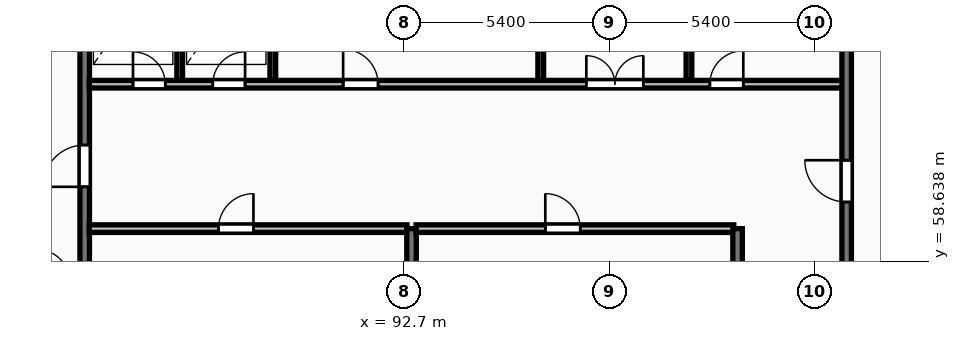
"""IFC4 building model, lengths in metres.
Left out: names, types, materials, properties, quantities, classifications, styles, units other than length and angle.
Written with IfcOpenShell. Run it as: python <this file> out.ifc"""

import sys

from ifc_helpers import new_model, si_unit, direction, frame, frame_2d, origin, place, context, subcontext, project, spatial, rectangle, extrude, element, fill, save


model = new_model("IFC4")
c1 = context("Model", 3, precision=1e-05, world=origin(), true_north=direction((0.0, 1.0)))
c2 = subcontext(c1, "Body", "Model", "MODEL_VIEW")
j1 = project(units=[si_unit("LENGTHUNIT", "METRE"), si_unit("PLANEANGLEUNIT", "RADIAN")], contexts=[c1])
p1 = place(None, origin())
s1 = spatial("IfcSite", under=j1, at=p1, CompositionType="ELEMENT")
p2 = place(p1, origin())
s2 = spatial("IfcBuilding", under=s1, at=p2, CompositionType="ELEMENT")
p3 = place(p2, frame((0.0, 0.0, 256.25)))
s3 = spatial("IfcBuildingStorey", under=s2, at=p3, CompositionType="ELEMENT", Elevation=256.25)
p4 = place(p3, frame((84.3, 55.4, 0.0), z_axis=(0.0, 0.0, 1.0), x_axis=(0.0, 1.0, 0.0)))
e1 = element("IfcWall", 1, at=p4, inside=s3, PredefinedType="SHEAR", context=c2, shape_type="SweptSolid", body=[
    extrude(rectangle(XDim=11.6, YDim=0.25, at=frame_2d((5.8, 0.0))), origin(), (0.0, 0.0, 1.0), 3.45),
])
p5 = place(p4, frame((5.2, 0.0, 0.0)))
e2 = element("IfcOpeningElement", 2, at=p5, cuts=e1, PredefinedType="OPENING", context=c2, shape_type="SweptSolid", body=[
    extrude(rectangle(XDim=1.1, YDim=2.1, at=frame_2d((0.55, 1.05))), frame((0.0, 0.135, 0.0), z_axis=(0.0, -1.0, 0.0), x_axis=(1.0, 0.0, 0.0)), (0.0, 0.0, 1.0), 0.27),
])
p6 = place(p3, frame((84.42, 59.5, 0.0), z_axis=(0.0, 0.0, 1.0), x_axis=(1.0, 0.0, 0.0)))
e3 = element("IfcWall", 3, at=p6, inside=s3, PredefinedType="PARTITIONING", context=c2, shape_type="SweptSolid", body=[
    extrude(rectangle(XDim=8.36, YDim=0.2, at=frame_2d((4.18, 0.0))), origin(), (0.0, 0.0, 1.0), 3.17),
])
p7 = place(p6, frame((3.4, 0.0, 0.0)))
e4 = element("IfcOpeningElement", 4, at=p7, cuts=e3, PredefinedType="OPENING", context=c2, shape_type="SweptSolid", body=[
    extrude(rectangle(XDim=0.92, YDim=2.08, at=frame_2d((0.46, 1.04))), frame((0.0, 0.11, 0.0), z_axis=(0.0, -1.0, 0.0), x_axis=(1.0, 0.0, 0.0)), (0.0, 0.0, 1.0), 0.22),
])
p8 = place(p3, frame((92.9, 55.4, 0.0), z_axis=(0.0, 0.0, 1.0), x_axis=(0.0, 1.0, 0.0)))
e5 = element("IfcWall", 5, at=p8, inside=s3, PredefinedType="SHEAR", context=c2, shape_type="SweptSolid", body=[
    extrude(rectangle(XDim=4.1, YDim=0.25, at=frame_2d((2.05, 0.0))), origin(), (0.0, 0.0, 1.0), 3.45),
])
p9 = place(p3, frame((93.02, 59.5, 0.0), z_axis=(0.0, 0.0, 1.0), x_axis=(1.0, 0.0, 0.0)))
e6 = element("IfcWall", 6, at=p9, inside=s3, PredefinedType="PARTITIONING", context=c2, shape_type="SweptSolid", body=[
    extrude(rectangle(XDim=8.36, YDim=0.2, at=frame_2d((4.18, 0.0))), origin(), (0.0, 0.0, 1.0), 3.17),
])
p10 = place(p9, frame((3.4, 0.0, 0.0)))
e7 = element("IfcOpeningElement", 7, at=p10, cuts=e6, PredefinedType="OPENING", context=c2, shape_type="SweptSolid", body=[
    extrude(rectangle(XDim=0.92, YDim=2.08, at=frame_2d((0.46, 1.04))), frame((0.0, 0.11, 0.0), z_axis=(0.0, -1.0, 0.0), x_axis=(1.0, 0.0, 0.0)), (0.0, 0.0, 1.0), 0.22),
])
p11 = place(p3, frame((101.48, 55.4, 0.0), z_axis=(0.0, 0.0, 1.0), x_axis=(0.0, 1.0, 0.0)))
e8 = element("IfcWall", 8, at=p11, inside=s3, PredefinedType="SHEAR", context=c2, shape_type="SweptSolid", body=[
    extrude(rectangle(XDim=4.1, YDim=0.25, at=frame_2d((2.05, 0.0))), origin(), (0.0, 0.0, 1.0), 3.45),
])
for number, where, z_axis, x_axis in (
    (9, (86.8, 63.4, 0.0), (0.0, 0.0, 1.0), (0.0, 1.0, 0.0)),
    (10, (89.25, 63.4, 0.0), (0.0, 0.0, 1.0), (0.0, 1.0, 0.0)),
    (11, (96.3, 63.4, 0.0), (0.0, 0.0, 1.0), (0.0, 1.0, 0.0)),
    (12, (100.2, 63.4, 0.0), (0.0, 0.0, 1.0), (0.0, 1.0, 0.0)),
):
    element("IfcWall", number, at=place(p3, frame(where, z_axis=z_axis, x_axis=x_axis)), inside=s3, PredefinedType="PARTITIONING", context=c2, shape_type="SweptSolid", body=[
        extrude(rectangle(XDim=3.6, YDim=0.15, at=frame_2d((1.8, 0.0))), origin(), (0.0, 0.0, 1.0), 3.17),
    ])
p12 = place(p3, frame((84.42, 63.3, 0.0), z_axis=(0.0, 0.0, 1.0), x_axis=(1.0, 0.0, 0.0)))
e13 = element("IfcWall", 13, at=p12, inside=s3, PredefinedType="PARTITIONING", context=c2, shape_type="SweptSolid", body=[
    extrude(rectangle(XDim=19.83, YDim=0.2, at=frame_2d((9.915, 0.0))), origin(), (0.0, 0.0, 1.0), 3.17),
])
p13 = place(p12, frame((1.15, 0.0, 0.0)))
e14 = element("IfcOpeningElement", 14, at=p13, cuts=e13, PredefinedType="OPENING", context=c2, shape_type="SweptSolid", body=[
    extrude(rectangle(XDim=0.85, YDim=2.05, at=frame_2d((0.425, 1.025))), frame((0.0, 0.11, 0.0), z_axis=(0.0, -1.0, 0.0), x_axis=(1.0, 0.0, 0.0)), (0.0, 0.0, 1.0), 0.22),
])
p14 = place(p12, frame((3.25, 0.0, 0.0)))
e15 = element("IfcOpeningElement", 15, at=p14, cuts=e13, PredefinedType="OPENING", context=c2, shape_type="SweptSolid", body=[
    extrude(rectangle(XDim=0.85, YDim=2.05, at=frame_2d((0.425, 1.025))), frame((0.0, 0.11, 0.0), z_axis=(0.0, -1.0, 0.0), x_axis=(1.0, 0.0, 0.0)), (0.0, 0.0, 1.0), 0.22),
])
p15 = place(p12, frame((13.08, 0.0, 0.0)))
e16 = element("IfcOpeningElement", 16, at=p15, cuts=e13, PredefinedType="OPENING", context=c2, shape_type="SweptSolid", body=[
    extrude(rectangle(XDim=1.5, YDim=2.2, at=frame_2d((0.75, 1.1))), frame((0.0, 0.11, 0.0), z_axis=(0.0, -1.0, 0.0), x_axis=(1.0, 0.0, 0.0)), (0.0, 0.0, 1.0), 0.22),
])
p16 = place(p12, frame((6.68, 0.0, 0.0)))
e17 = element("IfcOpeningElement", 17, at=p16, cuts=e13, PredefinedType="OPENING", context=c2, shape_type="SweptSolid", body=[
    extrude(rectangle(XDim=0.92, YDim=2.08, at=frame_2d((0.46, 1.04))), frame((0.0, 0.11, 0.0), z_axis=(0.0, -1.0, 0.0), x_axis=(1.0, 0.0, 0.0)), (0.0, 0.0, 1.0), 0.22),
])
p17 = place(p12, frame((16.33, 0.0, 0.0)))
e18 = element("IfcOpeningElement", 18, at=p17, cuts=e13, PredefinedType="OPENING", context=c2, shape_type="SweptSolid", body=[
    extrude(rectangle(XDim=0.88, YDim=2.06, at=frame_2d((0.44, 1.03))), frame((0.0, 0.11, 0.0), z_axis=(0.0, -1.0, 0.0), x_axis=(1.0, 0.0, 0.0)), (0.0, 0.0, 1.0), 0.22),
])
p18 = place(p3, frame((104.35, 58.4, 0.0), z_axis=(0.0, 0.0, 1.0), x_axis=(0.0, 1.0, 0.0)))
e19 = element("IfcWall", 19, at=p18, inside=s3, PredefinedType="SHEAR", context=c2, shape_type="SweptSolid", body=[
    extrude(rectangle(XDim=8.6, YDim=0.25, at=frame_2d((4.3, 0.0))), origin(), (0.0, 0.0, 1.0), 3.45),
])
p19 = place(p18, frame((1.8, 0.0, 0.0)))
e20 = element("IfcOpeningElement", 20, at=p19, cuts=e19, PredefinedType="OPENING", context=c2, shape_type="SweptSolid", body=[
    extrude(rectangle(XDim=1.1, YDim=2.1, at=frame_2d((0.55, 1.05))), frame((0.0, 0.135, 0.0), z_axis=(0.0, -1.0, 0.0), x_axis=(1.0, 0.0, 0.0)), (0.0, 0.0, 1.0), 0.27),
])
p20 = place(p5, origin())
e21 = element("IfcDoor", 21, at=p20, inside=s3, OperationType="SINGLE_SWING_LEFT", PredefinedType="DOOR", context=c2, shape_type="SweptSolid", body=[
    extrude(rectangle(XDim=1.1, YDim=2.1, at=frame_2d((0.55, 1.05))), frame((0.0, 0.025, 0.0), z_axis=(0.0, -1.0, 0.0), x_axis=(1.0, 0.0, 0.0)), (0.0, 0.0, 1.0), 0.05),
])
fill(e2, e21)
p21 = place(p7, origin())
e22 = element("IfcDoor", 22, at=p21, inside=s3, OperationType="SINGLE_SWING_RIGHT", PredefinedType="DOOR", context=c2, shape_type="SweptSolid", body=[
    extrude(rectangle(XDim=0.92, YDim=2.08, at=frame_2d((0.46, 1.04))), frame((0.0, 0.025, 0.0), z_axis=(0.0, -1.0, 0.0), x_axis=(1.0, 0.0, 0.0)), (0.0, 0.0, 1.0), 0.05),
])
fill(e4, e22)
p22 = place(p10, origin())
e23 = element("IfcDoor", 23, at=p22, inside=s3, OperationType="SINGLE_SWING_LEFT", PredefinedType="DOOR", context=c2, shape_type="SweptSolid", body=[
    extrude(rectangle(XDim=0.92, YDim=2.08, at=frame_2d((0.46, 1.04))), frame((0.0, 0.025, 0.0), z_axis=(0.0, -1.0, 0.0), x_axis=(1.0, 0.0, 0.0)), (0.0, 0.0, 1.0), 0.05),
])
fill(e7, e23)
p23 = place(p13, origin())
e24 = element("IfcDoor", 24, at=p23, inside=s3, OperationType="SINGLE_SWING_LEFT", PredefinedType="DOOR", context=c2, shape_type="SweptSolid", body=[
    extrude(rectangle(XDim=0.85, YDim=2.05, at=frame_2d((0.425, 1.025))), frame((0.0, 0.025, 0.0), z_axis=(0.0, -1.0, 0.0), x_axis=(1.0, 0.0, 0.0)), (0.0, 0.0, 1.0), 0.05),
])
fill(e14, e24)
p24 = place(p14, origin())
e25 = element("IfcDoor", 25, at=p24, inside=s3, OperationType="SINGLE_SWING_RIGHT", PredefinedType="DOOR", context=c2, shape_type="SweptSolid", body=[
    extrude(rectangle(XDim=0.85, YDim=2.05, at=frame_2d((0.425, 1.025))), frame((0.0, 0.025, 0.0), z_axis=(0.0, -1.0, 0.0), x_axis=(1.0, 0.0, 0.0)), (0.0, 0.0, 1.0), 0.05),
])
fill(e15, e25)
p25 = place(p15, origin())
e26 = element("IfcDoor", 26, at=p25, inside=s3, OperationType="DOUBLE_DOOR_SINGLE_SWING", PredefinedType="DOOR", context=c2, shape_type="SweptSolid", body=[
    extrude(rectangle(XDim=1.5, YDim=2.2, at=frame_2d((0.75, 1.1))), frame((0.0, 0.025, 0.0), z_axis=(0.0, -1.0, 0.0), x_axis=(1.0, 0.0, 0.0)), (0.0, 0.0, 1.0), 0.05),
])
fill(e16, e26)
p26 = place(p16, origin())
e27 = element("IfcDoor", 27, at=p26, inside=s3, OperationType="SINGLE_SWING_LEFT", PredefinedType="DOOR", context=c2, shape_type="SweptSolid", body=[
    extrude(rectangle(XDim=0.92, YDim=2.08, at=frame_2d((0.46, 1.04))), frame((0.0, 0.025, 0.0), z_axis=(0.0, -1.0, 0.0), x_axis=(1.0, 0.0, 0.0)), (0.0, 0.0, 1.0), 0.05),
])
fill(e17, e27)
p27 = place(p17, origin())
e28 = element("IfcDoor", 28, at=p27, inside=s3, OperationType="SINGLE_SWING_RIGHT", PredefinedType="DOOR", context=c2, shape_type="SweptSolid", body=[
    extrude(rectangle(XDim=0.88, YDim=2.06, at=frame_2d((0.44, 1.03))), frame((0.0, 0.025, 0.0), z_axis=(0.0, -1.0, 0.0), x_axis=(1.0, 0.0, 0.0)), (0.0, 0.0, 1.0), 0.05),
])
fill(e18, e28)
p28 = place(p19, origin())
e29 = element("IfcDoor", 29, at=p28, inside=s3, OperationType="SINGLE_SWING_RIGHT", PredefinedType="DOOR", context=c2, shape_type="SweptSolid", body=[
    extrude(rectangle(XDim=1.1, YDim=2.1, at=frame_2d((0.55, 1.05))), frame((0.0, 0.025, 0.0), z_axis=(0.0, -1.0, 0.0), x_axis=(1.0, 0.0, 0.0)), (0.0, 0.0, 1.0), 0.05),
])
fill(e20, e29)
save(model, sys.argv[1])
